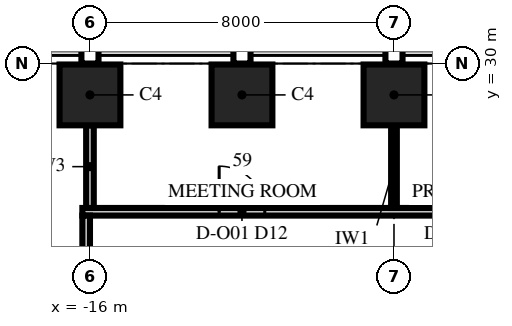
"""IFC4 building model, lengths in metres.
Left out: names, types, materials, properties, quantities, classifications, styles, units other than length and angle.
Written with IfcOpenShell. Run it as: python <this file> out.ifc"""

import sys

from ifc_helpers import new_model, si_unit, direction, frame, frame_2d, origin, origin_2d, place, context, subcontext, project, spatial, rectangle, extrude, element, fill, save


model = new_model("IFC4")
c1 = context("Model", 3, precision=1e-05, world=origin(), true_north=direction((0.0, 1.0)))
c2 = subcontext(c1, "Body", "Model", "MODEL_VIEW")
j1 = project(units=[si_unit("LENGTHUNIT", "METRE"), si_unit("PLANEANGLEUNIT", "RADIAN")], contexts=[c1])
p1 = place(None, origin())
s1 = spatial("IfcSite", under=j1, at=p1, CompositionType="ELEMENT")
p2 = place(p1, origin())
s2 = spatial("IfcBuilding", under=s1, at=p2, CompositionType="ELEMENT")
p3 = place(p2, frame((0.0, 0.0, 226.0)))
s3 = spatial("IfcBuildingStorey", under=s2, at=p3, CompositionType="ELEMENT", Elevation=226.0)
for number, where, z_axis, x_axis in (
    (1, (-8.0, 29.175, 0.0), (0.0, 0.0, 1.0), (-1.0, 0.0, 0.0)),
    (2, (-12.0, 29.175, 0.0), (0.0, 0.0, 1.0), (-1.0, 0.0, 0.0)),
    (3, (-16.0, 29.175, 0.0), (0.0, 0.0, 1.0), (-1.0, 0.0, 0.0)),
):
    element("IfcColumn", number, at=place(p3, frame(where, z_axis=z_axis, x_axis=x_axis)), inside=s3, PredefinedType="COLUMN", context=c2, shape_type="SweptSolid", body=[
        extrude(rectangle(XDim=1.6, YDim=1.6, at=origin_2d()), origin(), (0.0, 0.0, 1.0), 4.0),
    ])
p4 = place(p3, frame((-16.2, 26.1, 0.0), z_axis=(0.0, 0.0, 1.0), x_axis=(1.0, 0.0, 0.0)))
e4 = element("IfcWall", 4, at=p4, inside=s3, PredefinedType="PARTITIONING", context=c2, shape_type="SweptSolid", body=[
    extrude(rectangle(XDim=32.4, YDim=0.2, at=frame_2d((16.2, 0.0))), origin(), (0.0, 0.0, 1.0), 3.4),
])
p5 = place(p4, frame((3.6, 0.0, 0.0)))
e5 = element("IfcOpeningElement", 5, at=p5, cuts=e4, PredefinedType="OPENING", context=c2, shape_type="SweptSolid", body=[
    extrude(rectangle(XDim=1.2, YDim=2.4, at=frame_2d((0.6, 1.2))), frame((0.0, 0.115, 0.0), z_axis=(0.0, -1.0, 0.0), x_axis=(1.0, 0.0, 0.0)), (0.0, 0.0, 1.0), 0.23),
])
p6 = place(p4, frame((9.6, 0.0, 0.0)))
e6 = element("IfcOpeningElement", 6, at=p6, cuts=e4, PredefinedType="OPENING", context=c2, shape_type="SweptSolid", body=[
    extrude(rectangle(XDim=1.2, YDim=2.4, at=frame_2d((0.6, 1.2))), frame((0.0, 0.115, 0.0), z_axis=(0.0, -1.0, 0.0), x_axis=(1.0, 0.0, 0.0)), (0.0, 0.0, 1.0), 0.23),
])
p7 = place(p4, frame((13.6, 0.0, 0.0)))
e7 = element("IfcOpeningElement", 7, at=p7, cuts=e4, PredefinedType="OPENING", context=c2, shape_type="SweptSolid", body=[
    extrude(rectangle(XDim=1.2, YDim=2.4, at=frame_2d((0.6, 1.2))), frame((0.0, 0.115, 0.0), z_axis=(0.0, -1.0, 0.0), x_axis=(1.0, 0.0, 0.0)), (0.0, 0.0, 1.0), 0.23),
])
p8 = place(p4, frame((17.6, 0.0, 0.0)))
e8 = element("IfcOpeningElement", 8, at=p8, cuts=e4, PredefinedType="OPENING", context=c2, shape_type="SweptSolid", body=[
    extrude(rectangle(XDim=1.2, YDim=2.4, at=frame_2d((0.6, 1.2))), frame((0.0, 0.115, 0.0), z_axis=(0.0, -1.0, 0.0), x_axis=(1.0, 0.0, 0.0)), (0.0, 0.0, 1.0), 0.23),
])
p9 = place(p4, frame((23.6, 0.0, 0.0)))
e9 = element("IfcOpeningElement", 9, at=p9, cuts=e4, PredefinedType="OPENING", context=c2, shape_type="SweptSolid", body=[
    extrude(rectangle(XDim=1.2, YDim=2.4, at=frame_2d((0.6, 1.2))), frame((0.0, 0.115, 0.0), z_axis=(0.0, -1.0, 0.0), x_axis=(1.0, 0.0, 0.0)), (0.0, 0.0, 1.0), 0.23),
])
p10 = place(p4, frame((29.6, 0.0, 0.0)))
e10 = element("IfcOpeningElement", 10, at=p10, cuts=e4, PredefinedType="OPENING", context=c2, shape_type="SweptSolid", body=[
    extrude(rectangle(XDim=1.2, YDim=2.4, at=frame_2d((0.6, 1.2))), frame((0.0, 0.115, 0.0), z_axis=(0.0, -1.0, 0.0), x_axis=(1.0, 0.0, 0.0)), (0.0, 0.0, 1.0), 0.23),
])
p11 = place(p3, frame((-16.1, 1.94, 0.0), z_axis=(0.0, 0.0, 1.0), x_axis=(0.0, 1.0, 0.0)))
e11 = element("IfcWall", 11, at=p11, inside=s3, PredefinedType="PARTITIONING", context=c2, shape_type="SweptSolid", body=[
    extrude(rectangle(XDim=24.06, YDim=0.2, at=frame_2d((12.03, 0.0))), origin(), (0.0, 0.0, 1.0), 2.842),
])
p12 = place(p11, frame((6.46, 0.0, 0.0)))
e12 = element("IfcOpeningElement", 12, at=p12, cuts=e11, PredefinedType="OPENING", context=c2, shape_type="SweptSolid", body=[
    extrude(rectangle(XDim=1.2, YDim=2.4, at=frame_2d((0.6, 1.2))), frame((0.0, 0.115, 0.0), z_axis=(0.0, -1.0, 0.0), x_axis=(1.0, 0.0, 0.0)), (0.0, 0.0, 1.0), 0.23),
])
p13 = place(p3, frame((-16.0, 26.2, 0.0), z_axis=(0.0, 0.0, 1.0), x_axis=(0.0, 1.0, 0.0)))
e13 = element("IfcWall", 13, at=p13, inside=s3, PredefinedType="PARTITIONING", context=c2, shape_type="SweptSolid", body=[
    extrude(rectangle(XDim=2.175, YDim=0.2, at=frame_2d((1.087, 0.0))), origin(), (0.0, 0.0, 1.0), 3.4),
])
p14 = place(p3, frame((-8.0, 26.2, 0.0), z_axis=(0.0, 0.0, 1.0), x_axis=(0.0, 1.0, 0.0)))
e14 = element("IfcWall", 14, at=p14, inside=s3, PredefinedType="PARTITIONING", context=c2, shape_type="SweptSolid", body=[
    extrude(rectangle(XDim=2.175, YDim=0.15, at=frame_2d((1.087, 0.0))), origin(), (0.0, 0.0, 1.0), 3.4),
])
p15 = place(p5, origin())
e15 = element("IfcDoor", 15, at=p15, inside=s3, OperationType="SINGLE_SWING_LEFT", PredefinedType="DOOR", context=c2, shape_type="SweptSolid", body=[
    extrude(rectangle(XDim=1.2, YDim=2.4, at=frame_2d((0.6, 1.2))), frame((0.0, 0.1, 0.0), z_axis=(0.0, -1.0, 0.0), x_axis=(1.0, 0.0, 0.0)), (0.0, 0.0, 1.0), 0.199),
])
fill(e5, e15)
save(model, sys.argv[1])
